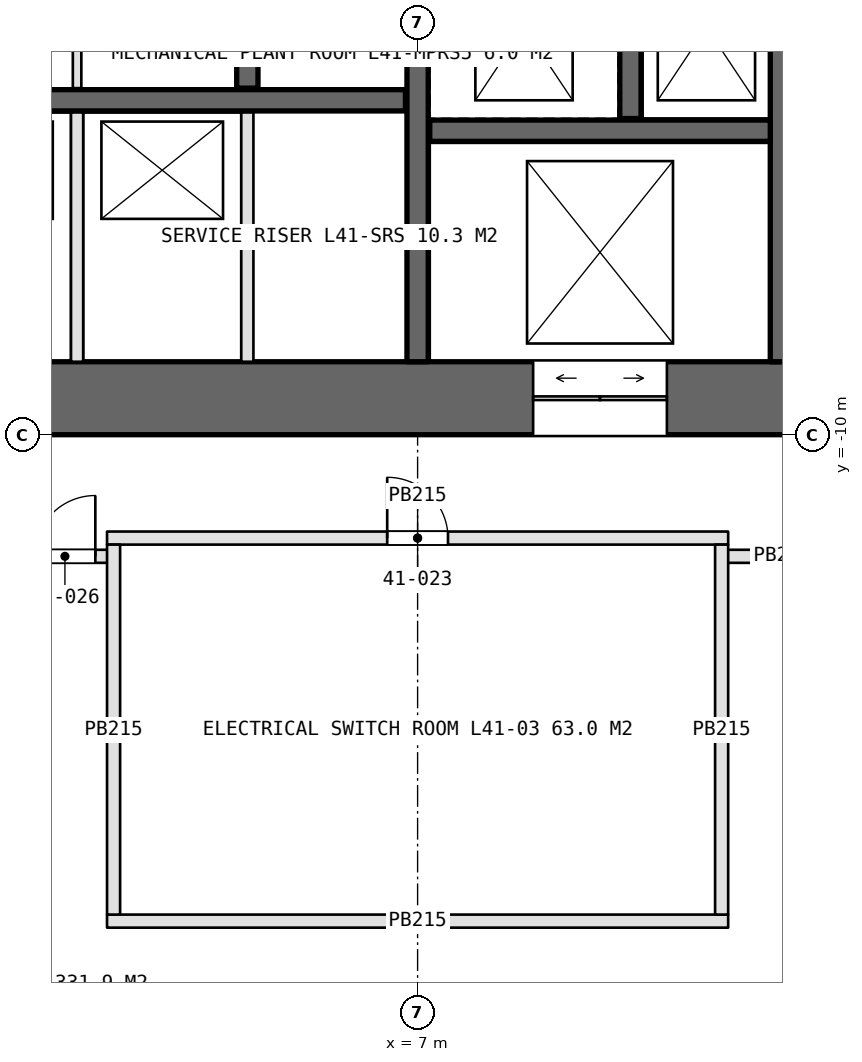
"""IFC4 building model, lengths in metres.
Left out: names, types, materials, properties, quantities, classifications, styles, units other than length and angle.
Written with IfcOpenShell. Run it as: python <this file> out.ifc"""

import sys

from ifc_helpers import new_model, si_unit, direction, frame, frame_2d, origin, place, context, subcontext, project, spatial, rectangle, extrude, element, fill, save


model = new_model("IFC4")
c1 = context("Model", 3, precision=1e-05, world=origin(), true_north=direction((0.0, 1.0)))
c2 = subcontext(c1, "Body", "Model", "MODEL_VIEW")
j1 = project(units=[si_unit("LENGTHUNIT", "METRE"), si_unit("PLANEANGLEUNIT", "RADIAN")], contexts=[c1])
p1 = place(None, origin())
s1 = spatial("IfcSite", under=j1, at=p1, CompositionType="ELEMENT")
p2 = place(p1, origin())
s2 = spatial("IfcBuilding", under=s1, at=p2, CompositionType="ELEMENT")
p3 = place(p2, frame((0.0, 0.0, 189.8)))
s3 = spatial("IfcBuildingStorey", under=s2, at=p3, CompositionType="ELEMENT", Elevation=189.8)
p4 = place(p3, frame((-14.0, -9.4, 0.0), z_axis=(0.0, 0.0, 1.0), x_axis=(1.0, 0.0, 0.0)))
e1 = element("IfcWall", 1, at=p4, inside=s3, PredefinedType="SHEAR", context=c2, shape_type="SweptSolid", body=[
    extrude(rectangle(XDim=28.0, YDim=1.2, at=frame_2d((14.0, 0.0))), origin(), (0.0, 0.0, 1.0), 5.0),
])
p5 = place(p4, frame((22.9, 0.0, 0.0)))
e2 = element("IfcOpeningElement", 2, at=p5, cuts=e1, PredefinedType="OPENING", context=c2, shape_type="SweptSolid", body=[
    extrude(rectangle(XDim=2.2, YDim=2.7, at=frame_2d((1.1, 1.35))), frame((0.0, 0.61, 0.0), z_axis=(0.0, -1.0, 0.0), x_axis=(1.0, 0.0, 0.0)), (0.0, 0.0, 1.0), 1.22),
])
p6 = place(p3, frame((13.4, -8.8, 0.0), z_axis=(0.0, 0.0, 1.0), x_axis=(0.0, 1.0, 0.0)))
e3 = element("IfcWall", 3, at=p6, inside=s3, PredefinedType="SHEAR", context=c2, shape_type="SweptSolid", body=[
    extrude(rectangle(XDim=17.6, YDim=1.2, at=frame_2d((8.8, 0.0))), origin(), (0.0, 0.0, 1.0), 5.0),
])
p7 = place(p6, frame((7.9, 0.0, 0.0)))
e4 = element("IfcOpeningElement", 4, at=p7, cuts=e3, PredefinedType="OPENING", context=c2, shape_type="SweptSolid", body=[
    extrude(rectangle(XDim=1.8, YDim=2.4, at=frame_2d((0.9, 1.2))), frame((0.0, 0.61, 0.0), z_axis=(0.0, -1.0, 0.0), x_axis=(1.0, 0.0, 0.0)), (0.0, 0.0, 1.0), 1.22),
])
p8 = place(p3, frame((7.0, -8.8, 0.0), z_axis=(0.0, 0.0, 1.0), x_axis=(0.0, 1.0, 0.0)))
e5 = element("IfcWall", 5, at=p8, inside=s3, PredefinedType="SHEAR", context=c2, shape_type="SweptSolid", body=[
    extrude(rectangle(XDim=17.6, YDim=0.35, at=frame_2d((8.8, 0.0))), origin(), (0.0, 0.0, 1.0), 5.0),
])
p9 = place(p8, frame((7.9, 0.0, 0.0)))
e6 = element("IfcOpeningElement", 6, at=p9, cuts=e5, PredefinedType="OPENING", context=c2, shape_type="SweptSolid", body=[
    extrude(rectangle(XDim=1.8, YDim=2.4, at=frame_2d((0.9, 1.2))), frame((0.0, 0.185, 0.0), z_axis=(0.0, -1.0, 0.0), x_axis=(1.0, 0.0, 0.0)), (0.0, 0.0, 1.0), 0.37),
])
p10 = place(p3, frame((-6.8, -4.5, 0.0), z_axis=(0.0, 0.0, 1.0), x_axis=(1.0, 0.0, 0.0)))
e7 = element("IfcWall", 7, at=p10, inside=s3, PredefinedType="SHEAR", context=c2, shape_type="SweptSolid", body=[
    extrude(rectangle(XDim=13.6, YDim=0.35, at=frame_2d((6.8, 0.0))), origin(), (0.0, 0.0, 1.0), 5.0),
])
p11 = place(p3, frame((10.5, -4.8, 0.0), z_axis=(0.0, 0.0, 1.0), x_axis=(0.0, 1.0, 0.0)))
e8 = element("IfcWall", 8, at=p11, inside=s3, PredefinedType="SHEAR", context=c2, shape_type="SweptSolid", body=[
    extrude(rectangle(XDim=3.0, YDim=0.35, at=frame_2d((1.5, 0.0))), origin(), (0.0, 0.0, 1.0), 5.0),
])
p12 = place(p3, frame((7.2, -5.0, 0.0), z_axis=(0.0, 0.0, 1.0), x_axis=(1.0, 0.0, 0.0)))
e9 = element("IfcWall", 9, at=p12, inside=s3, PredefinedType="SHEAR", context=c2, shape_type="SweptSolid", body=[
    extrude(rectangle(XDim=5.6, YDim=0.35, at=frame_2d((2.8, 0.0))), origin(), (0.0, 0.0, 1.0), 5.0),
])
p13 = place(p3, frame((4.2, -4.3, 0.0), z_axis=(0.0, 0.0, 1.0), x_axis=(0.0, 1.0, 0.0)))
e10 = element("IfcWall", 10, at=p13, inside=s3, PredefinedType="SHEAR", context=c2, shape_type="SweptSolid", body=[
    extrude(rectangle(XDim=2.5, YDim=0.35, at=frame_2d((1.25, 0.0))), origin(), (0.0, 0.0, 1.0), 5.0),
])
p14 = place(p3, frame((1.4, -1.8, 0.0), z_axis=(0.0, 0.0, 1.0), x_axis=(0.0, -1.0, 0.0)))
e11 = element("IfcWall", 11, at=p14, inside=s3, PredefinedType="PARTITIONING", context=c2, shape_type="SweptSolid", body=[
    extrude(rectangle(XDim=2.5, YDim=0.14, at=frame_2d((1.25, 0.0))), origin(), (0.0, 0.0, 1.0), 4.75),
])
for number, where, z_axis, x_axis in (
    (12, (1.4, -4.7, 0.0), (0.0, 0.0, 1.0), (0.0, -1.0, 0.0)),
    (13, (4.2, -4.7, 0.0), (0.0, 0.0, 1.0), (0.0, -1.0, 0.0)),
):
    element("IfcWall", number, at=place(p3, frame(where, z_axis=z_axis, x_axis=x_axis)), inside=s3, PredefinedType="PARTITIONING", context=c2, shape_type="SweptSolid", body=[
        extrude(rectangle(XDim=4.1, YDim=0.2, at=frame_2d((2.05, 0.0))), origin(), (0.0, 0.0, 1.0), 5.0),
    ])
p15 = place(p3, frame((-1.0, -12.0, 0.0), z_axis=(0.0, 0.0, 1.0), x_axis=(1.0, 0.0, 0.0)))
e14 = element("IfcWall", 14, at=p15, inside=s3, PredefinedType="PARTITIONING", context=c2, shape_type="SweptSolid", body=[
    extrude(rectangle(XDim=3.0, YDim=0.215, at=frame_2d((1.5, 0.0))), origin(), (0.0, 0.0, 1.0), 4.2),
])
p16 = place(p15, frame((1.7, 0.0, 0.0)))
e15 = element("IfcOpeningElement", 15, at=p16, cuts=e14, PredefinedType="OPENING", context=c2, shape_type="SweptSolid", body=[
    extrude(rectangle(XDim=1.0, YDim=2.2, at=frame_2d((0.5, 1.1))), frame((0.0, 0.118, 0.0), z_axis=(0.0, -1.0, 0.0), x_axis=(1.0, 0.0, 0.0)), (0.0, 0.0, 1.0), 0.235),
])
p17 = place(p3, frame((12.0, -12.0, 0.0), z_axis=(0.0, 0.0, 1.0), x_axis=(1.0, 0.0, 0.0)))
e16 = element("IfcWall", 16, at=p17, inside=s3, PredefinedType="PARTITIONING", context=c2, shape_type="SweptSolid", body=[
    extrude(rectangle(XDim=2.0, YDim=0.215, at=frame_2d((1.0, 0.0))), origin(), (0.0, 0.0, 1.0), 4.2),
])
p18 = place(p3, frame((1.893, -18.0, 0.0), z_axis=(0.0, 0.0, 1.0), x_axis=(1.0, 0.0, 0.0)))
e17 = element("IfcWall", 17, at=p18, inside=s3, PredefinedType="PARTITIONING", context=c2, shape_type="SweptSolid", body=[
    extrude(rectangle(XDim=10.215, YDim=0.215, at=frame_2d((5.107, 0.0))), origin(), (0.0, 0.0, 1.0), 4.2),
])
p19 = place(p3, frame((1.893, -11.7, 0.0), z_axis=(0.0, 0.0, 1.0), x_axis=(1.0, 0.0, 0.0)))
e18 = element("IfcWall", 18, at=p19, inside=s3, PredefinedType="PARTITIONING", context=c2, shape_type="SweptSolid", body=[
    extrude(rectangle(XDim=10.215, YDim=0.215, at=frame_2d((5.107, 0.0))), origin(), (0.0, 0.0, 1.0), 4.2),
])
p20 = place(p19, frame((4.607, 0.0, 0.0)))
e19 = element("IfcOpeningElement", 19, at=p20, cuts=e18, PredefinedType="OPENING", context=c2, shape_type="SweptSolid", body=[
    extrude(rectangle(XDim=1.0, YDim=2.2, at=frame_2d((0.5, 1.1))), frame((0.0, 0.118, 0.0), z_axis=(0.0, -1.0, 0.0), x_axis=(1.0, 0.0, 0.0)), (0.0, 0.0, 1.0), 0.235),
])
for number, where, z_axis, x_axis in (
    (20, (2.0, -17.893, 0.0), (0.0, 0.0, 1.0), (0.0, 1.0, 0.0)),
    (21, (12.0, -17.893, 0.0), (0.0, 0.0, 1.0), (0.0, 1.0, 0.0)),
):
    element("IfcWall", number, at=place(p3, frame(where, z_axis=z_axis, x_axis=x_axis)), inside=s3, PredefinedType="PARTITIONING", context=c2, shape_type="SweptSolid", body=[
        extrude(rectangle(XDim=6.085, YDim=0.215, at=frame_2d((3.042, 0.0))), origin(), (0.0, 0.0, 1.0), 4.2),
    ])
p21 = place(p5, origin())
e22 = element("IfcDoor", 22, at=p21, inside=s3, OperationType="DOUBLE_DOOR_SLIDING", PredefinedType="DOOR", context=c2, shape_type="SweptSolid", body=[
    extrude(rectangle(XDim=2.2, YDim=2.7, at=frame_2d((1.1, 1.35))), frame((0.0, 0.025, 0.0), z_axis=(0.0, -1.0, 0.0), x_axis=(1.0, 0.0, 0.0)), (0.0, 0.0, 1.0), 0.05),
])
fill(e2, e22)
p22 = place(p20, origin())
e23 = element("IfcDoor", 23, at=p22, inside=s3, OperationType="SINGLE_SWING_LEFT", PredefinedType="DOOR", context=c2, shape_type="SweptSolid", body=[
    extrude(rectangle(XDim=1.0, YDim=2.2, at=frame_2d((0.5, 1.1))), frame((0.0, 0.025, 0.0), z_axis=(0.0, -1.0, 0.0), x_axis=(1.0, 0.0, 0.0)), (0.0, 0.0, 1.0), 0.05),
])
fill(e19, e23)
p23 = place(p16, origin())
e24 = element("IfcDoor", 24, at=p23, inside=s3, OperationType="SINGLE_SWING_RIGHT", PredefinedType="DOOR", context=c2, shape_type="SweptSolid", body=[
    extrude(rectangle(XDim=1.0, YDim=2.2, at=frame_2d((0.5, 1.1))), frame((0.0, 0.025, 0.0), z_axis=(0.0, -1.0, 0.0), x_axis=(1.0, 0.0, 0.0)), (0.0, 0.0, 1.0), 0.05),
])
fill(e15, e24)
save(model, sys.argv[1])
